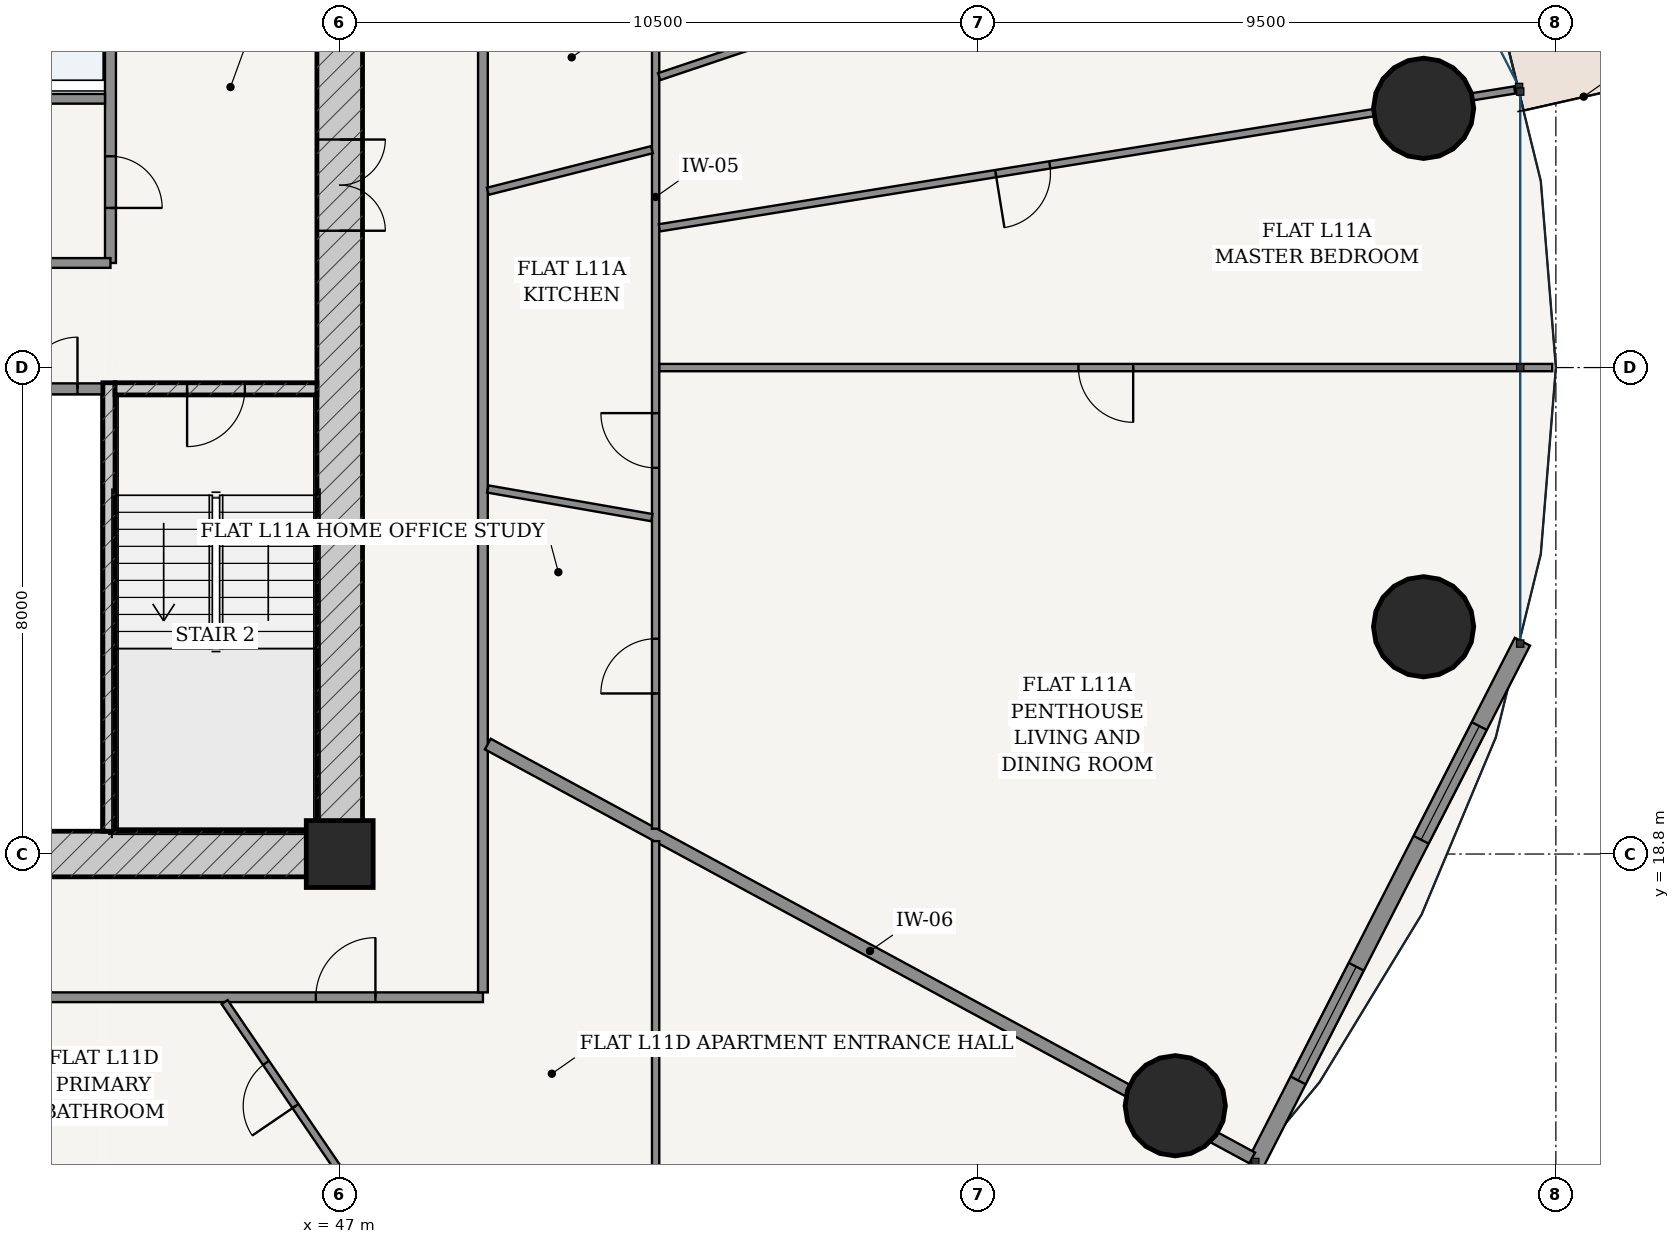
"""IFC4 building model, lengths in metres.
Left out: names, types, materials, properties, quantities, classifications, styles, units other than length and angle.
Written with IfcOpenShell. Run it as: python <this file> out.ifc"""

import sys

from ifc_helpers import new_model, si_unit, direction, frame, frame_2d, origin, origin_2d, place, context, subcontext, project, spatial, rectangle, hollow_circle, extrude, source, transform, mapped, element, fill, save


model = new_model("IFC4")
c1 = context("Model", 3, precision=1e-05, world=origin(), true_north=direction((-0.2419218956, 0.970295726276)))
c2 = subcontext(c1, "Body", "Model", "MODEL_VIEW")
j1 = project(units=[si_unit("LENGTHUNIT", "METRE"), si_unit("PLANEANGLEUNIT", "RADIAN")], contexts=[c1])
p1 = place(None, origin())
s1 = spatial("IfcSite", under=j1, at=p1, CompositionType="ELEMENT")
p2 = place(p1, origin())
s2 = spatial("IfcBuilding", under=s1, at=p2, CompositionType="ELEMENT")
p3 = place(p2, frame((0.0, 0.0, 45.6)))
s3 = spatial("IfcBuildingStorey", under=s2, at=p3, CompositionType="ELEMENT", Elevation=45.6)
p4 = place(p3, frame((47.0, 18.8, 0.0), z_axis=(0.0, 0.0, 1.0), x_axis=(1.0, 0.0, 0.0)))
e1 = element("IfcColumn", 1, at=p4, inside=s3, PredefinedType="COLUMN", context=c2, shape_type="SweptSolid", body=[
    extrude(rectangle(XDim=1.1, YDim=1.1, at=origin_2d()), origin(), (0.0, 0.0, 1.0), 3.6),
])
p5 = place(p3, frame((28.625, 18.8, 0.0), z_axis=(0.0, 0.0, 1.0), x_axis=(1.0, 0.0, 0.0)))
e2 = element("IfcWall", 2, at=p5, inside=s3, PredefinedType="SHEAR", context=c2, shape_type="SweptSolid", body=[
    extrude(rectangle(XDim=18.75, YDim=0.75, at=frame_2d((9.375, 0.0))), origin(), (0.0, 0.0, 1.0), 3.32),
])
p6 = place(p5, frame((7.627, 0.0, 0.0)))
e3 = element("IfcOpeningElement", 3, at=p6, cuts=e2, PredefinedType="OPENING", context=c2, shape_type="SweptSolid", body=[
    extrude(rectangle(XDim=0.85, YDim=2.1, at=frame_2d((0.425, 1.05))), frame((0.0, 0.385, 0.0), z_axis=(0.0, -1.0, 0.0), x_axis=(1.0, 0.0, 0.0)), (0.0, 0.0, 1.0), 0.77),
])
p7 = place(p5, frame((10.673, 0.0, 0.0)))
e4 = element("IfcOpeningElement", 4, at=p7, cuts=e2, PredefinedType="OPENING", context=c2, shape_type="SweptSolid", body=[
    extrude(rectangle(XDim=0.85, YDim=2.1, at=frame_2d((0.425, 1.05))), frame((0.0, 0.385, 0.0), z_axis=(0.0, -1.0, 0.0), x_axis=(1.0, 0.0, 0.0)), (0.0, 0.0, 1.0), 0.77),
])
p8 = place(p3, frame((47.0, 19.175, 0.0), z_axis=(0.0, 0.0, 1.0), x_axis=(0.0, 1.0, 0.0)))
e5 = element("IfcWall", 5, at=p8, inside=s3, PredefinedType="SHEAR", context=c2, shape_type="SweptSolid", body=[
    extrude(rectangle(XDim=15.25, YDim=0.75, at=frame_2d((7.625, 0.0))), origin(), (0.0, 0.0, 1.0), 3.32),
])
p9 = place(p8, frame((9.875, 0.0, 0.0)))
e6 = element("IfcOpeningElement", 6, at=p9, cuts=e5, PredefinedType="OPENING", context=c2, shape_type="SweptSolid", body=[
    extrude(rectangle(XDim=1.5, YDim=2.2, at=frame_2d((0.75, 1.1))), frame((0.0, 0.385, 0.0), z_axis=(0.0, -1.0, 0.0), x_axis=(1.0, 0.0, 0.0)), (0.0, 0.0, 1.0), 0.77),
])
p10 = place(p3, frame((43.205, 19.175, 0.0), z_axis=(0.0, 0.0, 1.0), x_axis=(0.0, 1.0, 0.0)))
e7 = element("IfcWall", 7, at=p10, inside=s3, PredefinedType="SOLIDWALL", context=c2, shape_type="SweptSolid", body=[
    extrude(rectangle(XDim=7.375, YDim=0.2, at=frame_2d((3.688, 0.0))), origin(), (0.0, 0.0, 1.0), 3.32),
])
p11 = place(p3, frame((43.305, 26.45, 0.0), z_axis=(0.0, 0.0, 1.0), x_axis=(1.0, 0.0, 0.0)))
e8 = element("IfcWall", 8, at=p11, inside=s3, PredefinedType="SOLIDWALL", context=c2, shape_type="SweptSolid", body=[
    extrude(rectangle(XDim=3.32, YDim=0.2, at=frame_2d((1.66, 0.0))), origin(), (0.0, 0.0, 1.0), 3.32),
])
p12 = place(p11, frame((1.185, 0.0, 0.0)))
e9 = element("IfcOpeningElement", 9, at=p12, cuts=e8, PredefinedType="OPENING", context=c2, shape_type="SweptSolid", body=[
    extrude(rectangle(XDim=0.95, YDim=2.15, at=frame_2d((0.475, 1.075))), frame((0.0, 0.11, 0.0), z_axis=(0.0, -1.0, 0.0), x_axis=(1.0, 0.0, 0.0)), (0.0, 0.0, 1.0), 0.22),
])
for number, where, z_axis, x_axis in (
    (10, (64.824, 31.063, 0.0), (0.0, 0.0, 1.0), (1.0, 0.0, 0.0)),
    (11, (60.741, 14.661, 0.0), (0.0, 0.0, 1.0), (1.0, 0.0, 0.0)),
    (12, (64.824, 22.537, 0.0), (0.0, 0.0, 1.0), (1.0, 0.0, 0.0)),
):
    element("IfcColumn", number, at=place(p3, frame(where, z_axis=z_axis, x_axis=x_axis)), inside=s3, PredefinedType="COLUMN", context=c2, shape_type="SweptSolid", body=[
        extrude(hollow_circle(Radius=0.825, WallThickness=0.05, at=origin_2d()), origin(), (0.0, 0.0, 1.0), 3.6),
    ])
p13 = place(p3, frame((62.051, 13.689, 0.0), z_axis=(0.0, 0.0, 1.0), x_axis=(0.455220575541, 0.890378698984, 0.0)))
e13 = element("IfcWall", 13, at=p13, inside=s3, PredefinedType="SOLIDWALL", context=c2, shape_type="SweptSolid", body=[
    extrude(rectangle(XDim=9.662, YDim=0.28, at=frame_2d((4.831, 0.0))), origin(), (0.0, 0.0, 1.0), 3.32),
])
p14 = place(p13, frame((1.559, 0.0, 0.85)))
e14 = element("IfcOpeningElement", 14, at=p14, cuts=e13, PredefinedType="OPENING", context=c2, shape_type="SweptSolid", body=[
    extrude(rectangle(XDim=2.1, YDim=1.95, at=frame_2d((1.05, 0.975))), frame((0.0, 0.15, 0.0), z_axis=(0.0, -1.0, 0.0), x_axis=(1.0, 0.0, 0.0)), (0.0, 0.0, 1.0), 0.3),
])
p15 = place(p13, frame((6.003, 0.0, 0.85)))
e15 = element("IfcOpeningElement", 15, at=p15, cuts=e13, PredefinedType="OPENING", context=c2, shape_type="SweptSolid", body=[
    extrude(rectangle(XDim=2.1, YDim=1.95, at=frame_2d((1.05, 0.975))), frame((0.0, 0.15, 0.0), z_axis=(0.0, -1.0, 0.0), x_axis=(1.0, 0.0, 0.0)), (0.0, 0.0, 1.0), 0.3),
])
p16 = place(p3, frame((41.425, 26.45, 0.0), z_axis=(0.0, 0.0, 1.0), x_axis=(1.0, 0.0, 0.0)))
e16 = element("IfcWall", 16, at=p16, inside=s3, PredefinedType="PARTITIONING", context=c2, shape_type="SweptSolid", body=[
    extrude(rectangle(XDim=1.675, YDim=0.18, at=frame_2d((0.837, 0.0))), origin(), (0.0, 0.0, 1.0), 3.32),
])
p17 = place(p16, frame((0.413, 0.0, 0.0)))
e17 = element("IfcOpeningElement", 17, at=p17, cuts=e16, PredefinedType="OPENING", context=c2, shape_type="SweptSolid", body=[
    extrude(rectangle(XDim=0.85, YDim=2.1, at=frame_2d((0.425, 1.05))), frame((0.0, 0.1, 0.0), z_axis=(0.0, -1.0, 0.0), x_axis=(1.0, 0.0, 0.0)), (0.0, 0.0, 1.0), 0.2),
])
p18 = place(p3, frame((43.23, 28.52, 0.0), z_axis=(0.0, 0.0, 1.0), x_axis=(0.0, 1.0, 0.0)))
e18 = element("IfcWall", 18, at=p18, inside=s3, PredefinedType="PARTITIONING", context=c2, shape_type="SweptSolid", body=[
    extrude(rectangle(XDim=5.905, YDim=0.18, at=frame_2d((2.953, 0.0))), origin(), (0.0, 0.0, 1.0), 3.32),
])
p19 = place(p18, frame((0.905, 0.0, 0.0)))
e19 = element("IfcOpeningElement", 19, at=p19, cuts=e18, PredefinedType="OPENING", context=c2, shape_type="SweptSolid", body=[
    extrude(rectangle(XDim=0.85, YDim=2.1, at=frame_2d((0.425, 1.05))), frame((0.0, 0.1, 0.0), z_axis=(0.0, -1.0, 0.0), x_axis=(1.0, 0.0, 0.0)), (0.0, 0.0, 1.0), 0.2),
])
p20 = place(p18, frame((3.655, 0.0, 0.0)))
e20 = element("IfcOpeningElement", 20, at=p20, cuts=e18, PredefinedType="OPENING", context=c2, shape_type="SweptSolid", body=[
    extrude(rectangle(XDim=1.15, YDim=2.2, at=frame_2d((0.575, 1.1))), frame((0.0, 0.1, 0.0), z_axis=(0.0, -1.0, 0.0), x_axis=(1.0, 0.0, 0.0)), (0.0, 0.0, 1.0), 0.2),
])
p21 = place(p3, frame((41.425, 31.22, 0.0), z_axis=(0.0, 0.0, 1.0), x_axis=(1.0, 0.0, 0.0)))
e21 = element("IfcWall", 21, at=p21, inside=s3, PredefinedType="PARTITIONING", context=c2, shape_type="SweptSolid", body=[
    extrude(rectangle(XDim=1.715, YDim=0.16, at=frame_2d((0.857, 0.0))), origin(), (0.0, 0.0, 1.0), 3.32),
])
p22 = place(p3, frame((41.425, 28.52, 0.0), z_axis=(0.0, 0.0, 1.0), x_axis=(1.0, 0.0, 0.0)))
e22 = element("IfcWall", 22, at=p22, inside=s3, PredefinedType="PARTITIONING", context=c2, shape_type="SweptSolid", body=[
    extrude(rectangle(XDim=1.805, YDim=0.16, at=frame_2d((0.902, 0.0))), origin(), (0.0, 0.0, 1.0), 3.32),
])
p23 = place(p3, frame((26.645, 16.445, 0.0), z_axis=(0.0, 0.0, 1.0), x_axis=(1.0, 0.0, 0.0)))
e23 = element("IfcWall", 23, at=p23, inside=s3, PredefinedType="PARTITIONING", context=c2, shape_type="SweptSolid", body=[
    extrude(rectangle(XDim=22.71, YDim=0.16, at=frame_2d((11.355, 0.0))), origin(), (0.0, 0.0, 1.0), 2.688),
])
p24 = place(p23, frame((19.962, 0.0, 0.0)))
e24 = element("IfcOpeningElement", 24, at=p24, cuts=e23, PredefinedType="OPENING", context=c2, shape_type="SweptSolid", body=[
    extrude(rectangle(XDim=0.98, YDim=2.2, at=frame_2d((0.49, 1.1))), frame((0.0, 0.09, 0.0), z_axis=(0.0, -1.0, 0.0), x_axis=(1.0, 0.0, 0.0)), (0.0, 0.0, 1.0), 0.18),
])
p25 = place(p3, frame((49.355, 16.525, 0.0), z_axis=(0.0, 0.0, 1.0), x_axis=(0.0, 1.0, 0.0)))
e25 = element("IfcWall", 25, at=p25, inside=s3, PredefinedType="PARTITIONING", context=c2, shape_type="SweptSolid", body=[
    extrude(rectangle(XDim=20.55, YDim=0.16, at=frame_2d((10.275, 0.0))), origin(), (0.0, 0.0, 1.0), 2.688),
])
p26 = place(p3, frame((49.435, 20.608, 0.0), z_axis=(0.0, 0.0, 1.0), x_axis=(0.879369737803, -0.476139542819, 0.0)))
e26 = element("IfcWall", 26, at=p26, inside=s3, PredefinedType="PARTITIONING", context=c2, shape_type="SweptSolid", body=[
    extrude(rectangle(XDim=14.295, YDim=0.2, at=frame_2d((7.147, 0.0))), origin(), (0.0, 0.0, 1.0), 2.688),
])
p27 = place(p3, frame((52.195, 39.995, 0.0), z_axis=(0.0, 0.0, 1.0), x_axis=(0.0, -1.0, 0.0)))
e27 = element("IfcWall", 27, at=p27, inside=s3, PredefinedType="PARTITIONING", context=c2, shape_type="SweptSolid", body=[
    extrude(rectangle(XDim=20.779, YDim=0.12, at=frame_2d((10.39, 0.0))), origin(), (0.0, 0.0, 1.0), 2.688),
])
p28 = place(p27, frame((13.944, 0.0, 0.0)))
e28 = element("IfcOpeningElement", 28, at=p28, cuts=e27, PredefinedType="OPENING", context=c2, shape_type="SweptSolid", body=[
    extrude(rectangle(XDim=0.9, YDim=2.15, at=frame_2d((0.45, 1.075))), frame((0.0, 0.07, 0.0), z_axis=(0.0, -1.0, 0.0), x_axis=(1.0, 0.0, 0.0)), (0.0, 0.0, 1.0), 0.14),
])
p29 = place(p27, frame((17.655, 0.0, 0.0)))
e29 = element("IfcOpeningElement", 29, at=p29, cuts=e27, PredefinedType="OPENING", context=c2, shape_type="SweptSolid", body=[
    extrude(rectangle(XDim=0.9, YDim=2.15, at=frame_2d((0.45, 1.075))), frame((0.0, 0.07, 0.0), z_axis=(0.0, -1.0, 0.0), x_axis=(1.0, 0.0, 0.0)), (0.0, 0.0, 1.0), 0.14),
])
p30 = place(p3, frame((52.257, 26.8, 0.0), z_axis=(0.0, 0.0, 1.0), x_axis=(1.0, 0.0, 0.0)))
e30 = element("IfcWall", 30, at=p30, inside=s3, PredefinedType="PARTITIONING", context=c2, shape_type="SweptSolid", body=[
    extrude(rectangle(XDim=14.683, YDim=0.12, at=frame_2d((7.341, 0.0))), origin(), (0.0, 0.0, 1.0), 2.762),
])
p31 = place(p30, frame((6.892, 0.0, 0.0)))
e31 = element("IfcOpeningElement", 31, at=p31, cuts=e30, PredefinedType="OPENING", context=c2, shape_type="SweptSolid", body=[
    extrude(rectangle(XDim=0.9, YDim=2.15, at=frame_2d((0.45, 1.075))), frame((0.0, 0.07, 0.0), z_axis=(0.0, -1.0, 0.0), x_axis=(1.0, 0.0, 0.0)), (0.0, 0.0, 1.0), 0.14),
])
p32 = place(p3, frame((52.256, 29.098, 0.0), z_axis=(0.0, 0.0, 1.0), x_axis=(0.987257017041, 0.159133850272, 0.0)))
e32 = element("IfcWall", 32, at=p32, inside=s3, PredefinedType="PARTITIONING", context=c2, shape_type="SweptSolid", body=[
    extrude(rectangle(XDim=14.248, YDim=0.12, at=frame_2d((7.124, 0.0))), origin(), (0.0, 0.0, 1.0), 2.688),
])
p33 = place(p32, frame((5.603, 0.0, 0.0)))
e33 = element("IfcOpeningElement", 33, at=p33, cuts=e32, PredefinedType="OPENING", context=c2, shape_type="SweptSolid", body=[
    extrude(rectangle(XDim=0.9, YDim=2.15, at=frame_2d((0.45, 1.075))), frame((0.0, 0.07, 0.0), z_axis=(0.0, -1.0, 0.0), x_axis=(1.0, 0.0, 0.0)), (0.0, 0.0, 1.0), 0.14),
])
p34 = place(p3, frame((52.254, 31.584, 0.0), z_axis=(0.0, 0.0, 1.0), x_axis=(0.948022802246, 0.318202398516, 0.0)))
e34 = element("IfcWall", 34, at=p34, inside=s3, PredefinedType="PARTITIONING", context=c2, shape_type="SweptSolid", body=[
    extrude(rectangle(XDim=13.163, YDim=0.12, at=frame_2d((6.582, 0.0))), origin(), (0.0, 0.0, 1.0), 2.762),
])
p35 = place(p34, frame((6.131, 0.0, 0.0)))
e35 = element("IfcOpeningElement", 35, at=p35, cuts=e34, PredefinedType="OPENING", context=c2, shape_type="SweptSolid", body=[
    extrude(rectangle(XDim=0.9, YDim=2.15, at=frame_2d((0.45, 1.075))), frame((0.0, 0.07, 0.0), z_axis=(0.0, -1.0, 0.0), x_axis=(1.0, 0.0, 0.0)), (0.0, 0.0, 1.0), 0.14),
])
p36 = place(p3, frame((49.435, 24.803, 0.0), z_axis=(0.0, 0.0, 1.0), x_axis=(0.985100365489, -0.171980434681, 0.0)))
e36 = element("IfcWall", 36, at=p36, inside=s3, PredefinedType="PARTITIONING", context=c2, shape_type="SweptSolid", body=[
    extrude(rectangle(XDim=2.74, YDim=0.12, at=frame_2d((1.37, 0.0))), origin(), (0.0, 0.0, 1.0), 3.32),
])
p37 = place(p3, frame((49.435, 29.699, 0.0), z_axis=(0.0, 0.0, 1.0), x_axis=(0.969327617988, 0.245772189243, 0.0)))
e37 = element("IfcWall", 37, at=p37, inside=s3, PredefinedType="PARTITIONING", context=c2, shape_type="SweptSolid", body=[
    extrude(rectangle(XDim=2.785, YDim=0.12, at=frame_2d((1.393, 0.0))), origin(), (0.0, 0.0, 1.0), 3.32),
])
p38 = place(p3, frame((52.195, 19.012, 0.0), z_axis=(0.0, 0.0, 1.0), x_axis=(0.0, -1.0, 0.0)))
e38 = element("IfcWall", 38, at=p38, inside=s3, PredefinedType="PARTITIONING", context=c2, shape_type="SweptSolid", body=[
    extrude(rectangle(XDim=5.407, YDim=0.12, at=frame_2d((2.704, 0.0))), origin(), (0.0, 0.0, 1.0), 2.999),
])
p39 = place(p3, frame((45.108, 16.365, 0.0), z_axis=(0.0, 0.0, 1.0), x_axis=(0.562992379509, -0.826462086617, 0.0)))
e39 = element("IfcWall", 39, at=p39, inside=s3, PredefinedType="PARTITIONING", context=c2, shape_type="SweptSolid", body=[
    extrude(rectangle(XDim=3.278, YDim=0.12, at=frame_2d((1.639, 0.0))), origin(), (0.0, 0.0, 1.0), 3.32),
])
p40 = place(p39, frame((1.209, 0.0, 0.0)))
e40 = element("IfcOpeningElement", 40, at=p40, cuts=e39, PredefinedType="OPENING", context=c2, shape_type="SweptSolid", body=[
    extrude(rectangle(XDim=0.86, YDim=2.15, at=frame_2d((0.43, 1.075))), frame((0.0, 0.07, 0.0), z_axis=(0.0, -1.0, 0.0), x_axis=(1.0, 0.0, 0.0)), (0.0, 0.0, 1.0), 0.14),
])
m1 = source(origin(), c2, "Body", "SweptSolid", [
    extrude(rectangle(XDim=2.1, YDim=1.95, at=frame_2d((1.05, 0.975))), frame((0.0, 0.03, 0.0), z_axis=(0.0, -1.0, 0.0), x_axis=(1.0, 0.0, 0.0)), (0.0, 0.0, 1.0), 0.06),
])
p41 = place(p14, origin())
e41 = element("IfcWindow", 41, at=p41, inside=s3, PartitioningType="SINGLE_PANEL", PredefinedType="WINDOW", context=c2, shape_type="MappedRepresentation", body=[
    mapped(m1, transform((0.0, 0.0, 0.0), scale=1.0)),
])
fill(e14, e41)
p42 = place(p15, origin())
e42 = element("IfcWindow", 42, at=p42, inside=s3, PartitioningType="SINGLE_PANEL", PredefinedType="WINDOW", context=c2, shape_type="MappedRepresentation", body=[
    mapped(m1, transform((0.0, 0.0, 0.0), scale=1.0)),
])
fill(e15, e42)
m2 = source(origin(), c2, "Body", "SweptSolid", [
    extrude(rectangle(XDim=1.5, YDim=2.2, at=frame_2d((0.75, 1.1))), frame((0.0, 0.025, 0.0), z_axis=(0.0, -1.0, 0.0), x_axis=(1.0, 0.0, 0.0)), (0.0, 0.0, 1.0), 0.05),
])
p43 = place(p9, frame((1.5, 0.0, 0.0), z_axis=(0.0, 0.0, 1.0), x_axis=(-1.0, 0.0, 0.0)))
e43 = element("IfcDoor", 43, at=p43, inside=s3, OperationType="DOUBLE_DOOR_SINGLE_SWING", PredefinedType="DOOR", context=c2, shape_type="MappedRepresentation", body=[
    mapped(m2, transform((0.0, 0.0, 0.0), scale=1.0)),
])
fill(e6, e43)
m3 = source(origin(), c2, "Body", "SweptSolid", [
    extrude(rectangle(XDim=0.95, YDim=2.15, at=frame_2d((0.475, 1.075))), frame((0.0, 0.025, 0.0), z_axis=(0.0, -1.0, 0.0), x_axis=(1.0, 0.0, 0.0)), (0.0, 0.0, 1.0), 0.05),
])
p44 = place(p12, frame((0.95, 0.0, 0.0), z_axis=(0.0, 0.0, 1.0), x_axis=(-1.0, 0.0, 0.0)))
e44 = element("IfcDoor", 44, at=p44, inside=s3, OperationType="SINGLE_SWING_RIGHT", PredefinedType="DOOR", context=c2, shape_type="MappedRepresentation", body=[
    mapped(m3, transform((0.0, 0.0, 0.0), scale=1.0)),
])
fill(e9, e44)
m4 = source(origin(), c2, "Body", "SweptSolid", [
    extrude(rectangle(XDim=0.85, YDim=2.1, at=frame_2d((0.425, 1.05))), frame((0.0, 0.025, 0.0), z_axis=(0.0, -1.0, 0.0), x_axis=(1.0, 0.0, 0.0)), (0.0, 0.0, 1.0), 0.05),
])
p45 = place(p17, origin())
e45 = element("IfcDoor", 45, at=p45, inside=s3, OperationType="SINGLE_SWING_RIGHT", PredefinedType="DOOR", context=c2, shape_type="MappedRepresentation", body=[
    mapped(m4, transform((0.0, 0.0, 0.0), scale=1.0)),
])
fill(e17, e45)
p46 = place(p19, frame((0.85, 0.0, 0.0), z_axis=(0.0, 0.0, 1.0), x_axis=(-1.0, 0.0, 0.0)))
e46 = element("IfcDoor", 46, at=p46, inside=s3, OperationType="SINGLE_SWING_RIGHT", PredefinedType="DOOR", context=c2, shape_type="MappedRepresentation", body=[
    mapped(m4, transform((0.0, 0.0, 0.0), scale=1.0)),
])
fill(e19, e46)
m5 = source(origin(), c2, "Body", "SweptSolid", [
    extrude(rectangle(XDim=0.9, YDim=2.15, at=frame_2d((0.45, 1.075))), frame((0.0, 0.025, 0.0), z_axis=(0.0, -1.0, 0.0), x_axis=(1.0, 0.0, 0.0)), (0.0, 0.0, 1.0), 0.05),
])
p47 = place(p33, frame((0.9, 0.0, 0.0), z_axis=(0.0, 0.0, 1.0), x_axis=(-1.0, 0.0, 0.0)))
e47 = element("IfcDoor", 47, at=p47, inside=s3, OperationType="SINGLE_SWING_RIGHT", PredefinedType="DOOR", context=c2, shape_type="MappedRepresentation", body=[
    mapped(m5, transform((0.0, 0.0, 0.0), scale=1.0)),
])
fill(e33, e47)
p48 = place(p31, frame((0.9, 0.0, 0.0), z_axis=(0.0, 0.0, 1.0), x_axis=(-1.0, 0.0, 0.0)))
e48 = element("IfcDoor", 48, at=p48, inside=s3, OperationType="SINGLE_SWING_LEFT", PredefinedType="DOOR", context=c2, shape_type="MappedRepresentation", body=[
    mapped(m5, transform((0.0, 0.0, 0.0), scale=1.0)),
])
fill(e31, e48)
p49 = place(p28, frame((0.9, 0.0, 0.0), z_axis=(0.0, 0.0, 1.0), x_axis=(-1.0, 0.0, 0.0)))
e49 = element("IfcDoor", 49, at=p49, inside=s3, OperationType="SINGLE_SWING_RIGHT", PredefinedType="DOOR", context=c2, shape_type="MappedRepresentation", body=[
    mapped(m5, transform((0.0, 0.0, 0.0), scale=1.0)),
])
fill(e28, e49)
p50 = place(p29, frame((0.9, 0.0, 0.0), z_axis=(0.0, 0.0, 1.0), x_axis=(-1.0, 0.0, 0.0)))
e50 = element("IfcDoor", 50, at=p50, inside=s3, OperationType="SINGLE_SWING_LEFT", PredefinedType="DOOR", context=c2, shape_type="MappedRepresentation", body=[
    mapped(m5, transform((0.0, 0.0, 0.0), scale=1.0)),
])
fill(e29, e50)
m6 = source(origin(), c2, "Body", "SweptSolid", [
    extrude(rectangle(XDim=0.98, YDim=2.2, at=frame_2d((0.49, 1.1))), frame((0.0, 0.025, 0.0), z_axis=(0.0, -1.0, 0.0), x_axis=(1.0, 0.0, 0.0)), (0.0, 0.0, 1.0), 0.05),
])
p51 = place(p24, origin())
e51 = element("IfcDoor", 51, at=p51, inside=s3, OperationType="SINGLE_SWING_RIGHT", PredefinedType="DOOR", context=c2, shape_type="MappedRepresentation", body=[
    mapped(m6, transform((0.0, 0.0, 0.0), scale=1.0)),
])
fill(e24, e51)
m7 = source(origin(), c2, "Body", "SweptSolid", [
    extrude(rectangle(XDim=0.86, YDim=2.15, at=frame_2d((0.43, 1.075))), frame((0.0, 0.025, 0.0), z_axis=(0.0, -1.0, 0.0), x_axis=(1.0, 0.0, 0.0)), (0.0, 0.0, 1.0), 0.05),
])
p52 = place(p40, frame((0.86, 0.0, 0.0), z_axis=(0.0, 0.0, 1.0), x_axis=(-1.0, 0.0, 0.0)))
e52 = element("IfcDoor", 52, at=p52, inside=s3, OperationType="SINGLE_SWING_LEFT", PredefinedType="DOOR", context=c2, shape_type="MappedRepresentation", body=[
    mapped(m7, transform((0.0, 0.0, 0.0), scale=1.0)),
])
fill(e40, e52)
save(model, sys.argv[1])
